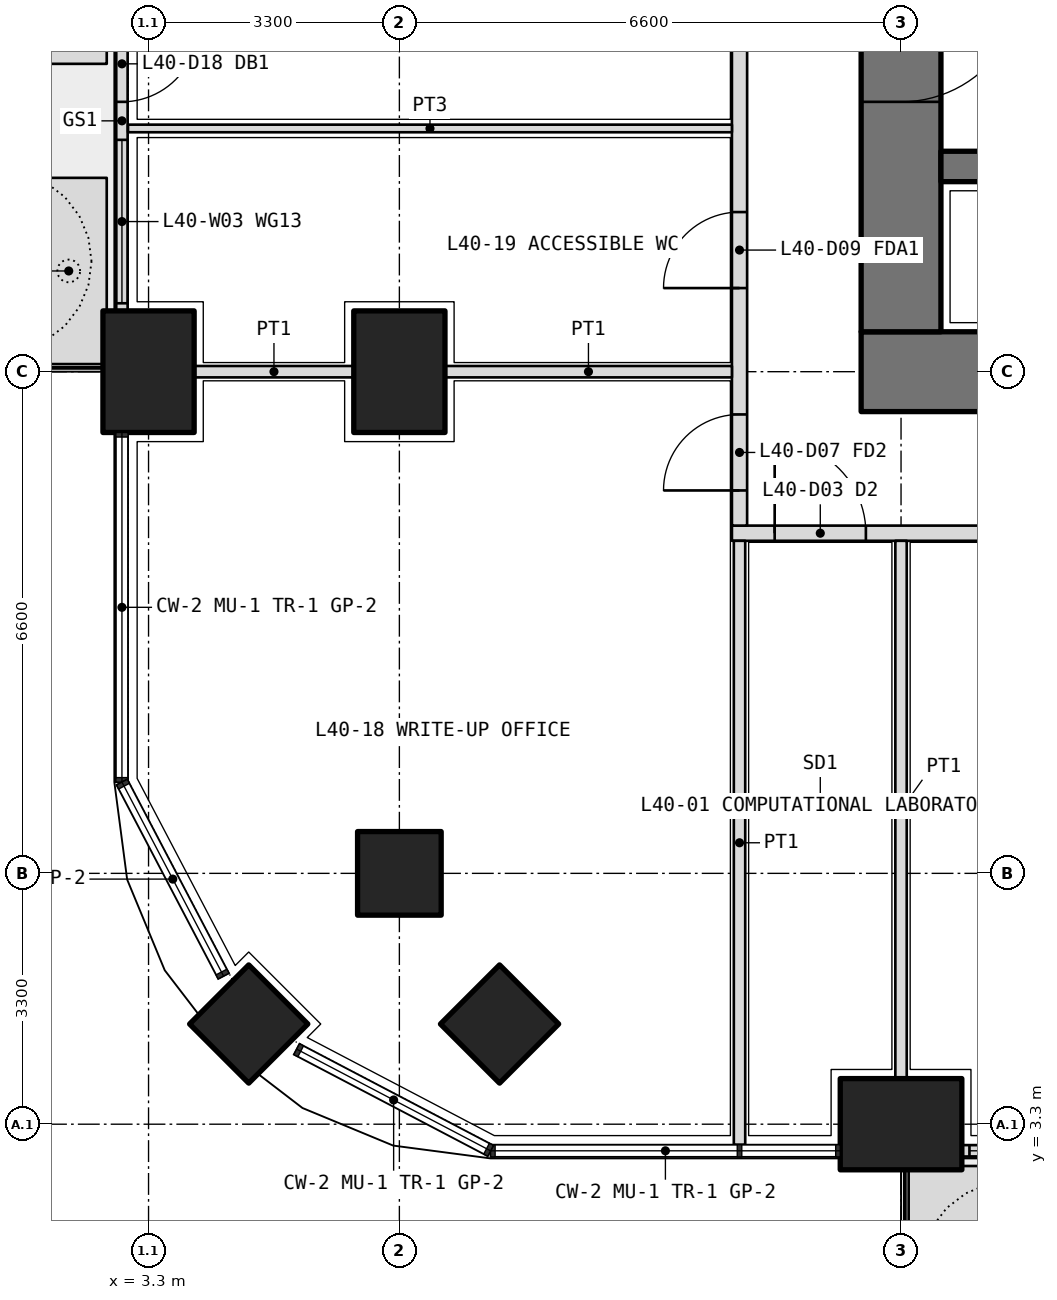
"""IFC4 building model, lengths in metres.
Left out: names, types, materials, properties, quantities, classifications, styles, units other than length and angle.
Written with IfcOpenShell. Run it as: python <this file> out.ifc"""

import sys

from ifc_helpers import new_model, si_unit, direction, frame, frame_2d, origin, origin_2d, place, context, subcontext, project, spatial, polyline, rectangle, outline, extrude, element, fill, save


model = new_model("IFC4")
c1 = context("Model", 3, precision=1e-05, world=origin(), true_north=direction((0.0, 1.0)))
c2 = subcontext(c1, "Body", "Model", "MODEL_VIEW")
j1 = project(units=[si_unit("LENGTHUNIT", "METRE"), si_unit("PLANEANGLEUNIT", "RADIAN")], contexts=[c1])
p1 = place(None, origin())
s1 = spatial("IfcSite", under=j1, at=p1, CompositionType="ELEMENT")
p2 = place(p1, origin())
s2 = spatial("IfcBuilding", under=s1, at=p2, CompositionType="ELEMENT")
p3 = place(p2, frame((0.0, 0.0, 176.7)))
s3 = spatial("IfcBuildingStorey", under=s2, at=p3, CompositionType="ELEMENT", Elevation=176.7)
p4 = place(p3, frame((4.618, 4.618, 0.0), z_axis=(0.0, 0.0, 1.0), x_axis=(0.707106781187, 0.707106781187, 0.0)))
e1 = element("IfcColumn", 1, at=p4, inside=s3, PredefinedType="COLUMN", context=c2, shape_type="SweptSolid", body=[
    extrude(rectangle(XDim=1.1, YDim=1.1, at=origin_2d()), origin(), (0.0, 0.0, 1.0), 4.2),
])
for number, where, z_axis, x_axis in (
    (2, (13.2, 3.3, 0.0), (0.0, 0.0, 1.0), (1.0, 0.0, 0.0)),
    (3, (3.3, 13.2, 0.0), (0.0, 0.0, 1.0), (0.0, 1.0, 0.0)),
):
    element("IfcColumn", number, at=place(p3, frame(where, z_axis=z_axis, x_axis=x_axis)), inside=s3, PredefinedType="COLUMN", context=c2, shape_type="SweptSolid", body=[
        extrude(rectangle(XDim=1.6, YDim=1.2, at=origin_2d()), origin(), (0.0, 0.0, 1.0), 4.2),
    ])
for number, where, z_axis, x_axis in (
    (4, (6.6, 6.6, 0.0), (0.0, 0.0, 1.0), (1.0, 0.0, 0.0)),
    (5, (7.918, 4.618, 0.0), (0.0, 0.0, 1.0), (0.707, 0.707, 0.0)),
):
    element("IfcColumn", number, at=place(p3, frame(where, z_axis=z_axis, x_axis=x_axis)), inside=s3, PredefinedType="COLUMN", context=c2, shape_type="SweptSolid", body=[
        extrude(rectangle(XDim=1.1, YDim=1.1, at=origin_2d()), origin(), (0.0, 0.0, 1.0), 4.2),
    ])
p5 = place(p3, frame((6.6, 13.2, 0.0), z_axis=(0.0, 0.0, 1.0), x_axis=(0.0, 1.0, 0.0)))
e6 = element("IfcColumn", 6, at=p5, inside=s3, PredefinedType="COLUMN", context=c2, shape_type="SweptSolid", body=[
    extrude(rectangle(XDim=1.6, YDim=1.2, at=origin_2d()), origin(), (0.0, 0.0, 1.0), 4.2),
])
p6 = place(p3, origin())
e7 = element("IfcWall", 7, at=p6, inside=s3, PredefinedType="USERDEFINED", context=c2, shape_type="SweptSolid", body=[
    extrude(outline(polyline([(13.3, 1.75), (15.75, 1.75), (15.75, 2.75), (13.3, 2.75), (13.3, 1.75)]), holes=[polyline([(13.45, 1.9), (15.6, 1.9), (15.6, 2.6), (13.45, 2.6), (13.45, 1.9)])]), origin(), (0.0, 0.0, 1.0), 1.05),
])
p7 = place(p3, origin())
e8 = element("IfcWall", 8, at=p7, inside=s3, PredefinedType="USERDEFINED", context=c2, shape_type="SweptSolid", body=[
    extrude(outline(polyline([(1.75, 13.3), (2.75, 13.3), (2.75, 15.75), (1.75, 15.75), (1.75, 13.3)]), holes=[polyline([(1.9, 13.45), (2.6, 13.45), (2.6, 15.6), (1.9, 15.6), (1.9, 13.45)])]), origin(), (0.0, 0.0, 1.0), 1.05),
])
p8 = place(p3, origin())
e9 = element("IfcWall", 9, at=p8, inside=s3, PredefinedType="USERDEFINED", context=c2, shape_type="SweptSolid", body=[
    extrude(outline(polyline([(1.75, 17.25), (2.75, 17.25), (2.75, 26.3), (1.75, 26.3), (1.75, 17.25)]), holes=[polyline([(1.9, 17.4), (2.6, 17.4), (2.6, 26.15), (1.9, 26.15), (1.9, 17.4)])]), origin(), (0.0, 0.0, 1.0), 1.05),
])
p9 = place(p3, frame((14.0, 2.95, 0.0), z_axis=(0.0, 0.0, 1.0), x_axis=(1.0, 0.0, 0.0)))
e10 = element("IfcWall", 10, at=p9, inside=s3, PredefinedType="SOLIDWALL", context=c2, shape_type="SweptSolid", body=[
    extrude(rectangle(XDim=5.0, YDim=0.15, at=frame_2d((2.5, 0.0))), origin(), (0.0, 0.0, 1.0), 2.7),
])
p10 = place(p9, frame((2.75, 0.0, 0.0)))
e11 = element("IfcOpeningElement", 11, at=p10, cuts=e10, PredefinedType="OPENING", context=c2, shape_type="SweptSolid", body=[
    extrude(rectangle(XDim=1.0, YDim=2.4, at=frame_2d((0.5, 1.2))), frame((0.0, 0.085, 0.0), z_axis=(0.0, -1.0, 0.0), x_axis=(1.0, 0.0, 0.0)), (0.0, 0.0, 1.0), 0.17),
])
p11 = place(p9, frame((0.1, 0.0, 0.1)))
e12 = element("IfcOpeningElement", 12, at=p11, cuts=e10, PredefinedType="OPENING", context=c2, shape_type="SweptSolid", body=[
    extrude(rectangle(XDim=2.15, YDim=2.3, at=frame_2d((1.075, 1.15))), frame((0.0, 0.085, 0.0), z_axis=(0.0, -1.0, 0.0), x_axis=(1.0, 0.0, 0.0)), (0.0, 0.0, 1.0), 0.17),
])
p12 = place(p9, frame((3.85, 0.0, 0.1)))
e13 = element("IfcOpeningElement", 13, at=p12, cuts=e10, PredefinedType="OPENING", context=c2, shape_type="SweptSolid", body=[
    extrude(rectangle(XDim=1.05, YDim=2.3, at=frame_2d((0.525, 1.15))), frame((0.0, 0.085, 0.0), z_axis=(0.0, -1.0, 0.0), x_axis=(1.0, 0.0, 0.0)), (0.0, 0.0, 1.0), 0.17),
])
p13 = place(p3, frame((2.95, 19.0, 0.0), z_axis=(0.0, 0.0, 1.0), x_axis=(0.0, -1.0, 0.0)))
e14 = element("IfcWall", 14, at=p13, inside=s3, PredefinedType="SOLIDWALL", context=c2, shape_type="SweptSolid", body=[
    extrude(rectangle(XDim=5.0, YDim=0.15, at=frame_2d((2.5, 0.0))), origin(), (0.0, 0.0, 1.0), 2.7),
])
p14 = place(p13, frame((1.25, 0.0, 0.0)))
e15 = element("IfcOpeningElement", 15, at=p14, cuts=e14, PredefinedType="OPENING", context=c2, shape_type="SweptSolid", body=[
    extrude(rectangle(XDim=1.0, YDim=2.4, at=frame_2d((0.5, 1.2))), frame((0.0, 0.085, 0.0), z_axis=(0.0, -1.0, 0.0), x_axis=(1.0, 0.0, 0.0)), (0.0, 0.0, 1.0), 0.17),
])
p15 = place(p13, frame((0.1, 0.0, 0.1)))
e16 = element("IfcOpeningElement", 16, at=p15, cuts=e14, PredefinedType="OPENING", context=c2, shape_type="SweptSolid", body=[
    extrude(rectangle(XDim=1.05, YDim=2.3, at=frame_2d((0.525, 1.15))), frame((0.0, 0.085, 0.0), z_axis=(0.0, -1.0, 0.0), x_axis=(1.0, 0.0, 0.0)), (0.0, 0.0, 1.0), 0.17),
])
p16 = place(p13, frame((2.75, 0.0, 0.1)))
e17 = element("IfcOpeningElement", 17, at=p16, cuts=e14, PredefinedType="OPENING", context=c2, shape_type="SweptSolid", body=[
    extrude(rectangle(XDim=2.15, YDim=2.3, at=frame_2d((1.075, 1.15))), frame((0.0, 0.085, 0.0), z_axis=(0.0, -1.0, 0.0), x_axis=(1.0, 0.0, 0.0)), (0.0, 0.0, 1.0), 0.17),
])
p17 = place(p3, frame((12.675, 13.2, 0.0), z_axis=(0.0, 0.0, 1.0), x_axis=(1.0, 0.0, 0.0)))
e18 = element("IfcWall", 18, at=p17, inside=s3, PredefinedType="SHEAR", context=c2, shape_type="SweptSolid", body=[
    extrude(rectangle(XDim=27.45, YDim=1.05, at=frame_2d((13.725, 0.0))), origin(), (0.0, 0.0, 1.0), 4.2),
])
p18 = place(p3, frame((13.2, 32.475, 0.0), z_axis=(0.0, 0.0, 1.0), x_axis=(0.0, -1.0, 0.0)))
e19 = element("IfcWall", 19, at=p18, inside=s3, PredefinedType="SHEAR", context=c2, shape_type="SweptSolid", body=[
    extrude(rectangle(XDim=18.75, YDim=1.05, at=frame_2d((9.375, 0.0))), origin(), (0.0, 0.0, 1.0), 4.2),
])
p19 = place(p18, frame((14.125, 0.0, 0.0)))
e20 = element("IfcOpeningElement", 20, at=p19, cuts=e19, PredefinedType="OPENING", context=c2, shape_type="SweptSolid", body=[
    extrude(rectangle(XDim=1.6, YDim=2.1, at=frame_2d((0.8, 1.05))), frame((0.0, 0.535, 0.0), z_axis=(0.0, -1.0, 0.0), x_axis=(1.0, 0.0, 0.0)), (0.0, 0.0, 1.0), 1.07),
])
p20 = place(p18, frame((3.325, 0.0, 0.0)))
e21 = element("IfcOpeningElement", 21, at=p20, cuts=e19, PredefinedType="OPENING", context=c2, shape_type="SweptSolid", body=[
    extrude(rectangle(XDim=1.6, YDim=2.1, at=frame_2d((0.8, 1.05))), frame((0.0, 0.535, 0.0), z_axis=(0.0, -1.0, 0.0), x_axis=(1.0, 0.0, 0.0)), (0.0, 0.0, 1.0), 1.07),
])
p21 = place(p3, frame((13.725, 15.9, 0.0), z_axis=(0.0, 0.0, 1.0), x_axis=(1.0, 0.0, 0.0)))
e22 = element("IfcWall", 22, at=p21, inside=s3, PredefinedType="SHEAR", context=c2, shape_type="SweptSolid", body=[
    extrude(rectangle(XDim=25.35, YDim=0.4, at=frame_2d((12.675, 0.0))), origin(), (0.0, 0.0, 1.0), 4.2),
])
p22 = place(p21, frame((0.837, 0.0, 0.0)))
e23 = element("IfcOpeningElement", 23, at=p22, cuts=e22, PredefinedType="OPENING", context=c2, shape_type="SweptSolid", body=[
    extrude(rectangle(XDim=1.0, YDim=2.1, at=frame_2d((0.5, 1.05))), frame((0.0, 0.21, 0.0), z_axis=(0.0, -1.0, 0.0), x_axis=(1.0, 0.0, 0.0)), (0.0, 0.0, 1.0), 0.42),
])
p23 = place(p21, frame((3.925, 0.0, 0.0)))
e24 = element("IfcOpeningElement", 24, at=p23, cuts=e22, PredefinedType="OPENING", context=c2, shape_type="SweptSolid", body=[
    extrude(rectangle(XDim=1.0, YDim=2.1, at=frame_2d((0.5, 1.05))), frame((0.0, 0.21, 0.0), z_axis=(0.0, -1.0, 0.0), x_axis=(1.0, 0.0, 0.0)), (0.0, 0.0, 1.0), 0.42),
])
p24 = place(p21, frame((7.225, 0.0, 0.0)))
e25 = element("IfcOpeningElement", 25, at=p24, cuts=e22, PredefinedType="OPENING", context=c2, shape_type="SweptSolid", body=[
    extrude(rectangle(XDim=1.0, YDim=2.1, at=frame_2d((0.5, 1.05))), frame((0.0, 0.21, 0.0), z_axis=(0.0, -1.0, 0.0), x_axis=(1.0, 0.0, 0.0)), (0.0, 0.0, 1.0), 0.42),
])
p25 = place(p21, frame((10.525, 0.0, 0.0)))
e26 = element("IfcOpeningElement", 26, at=p25, cuts=e22, PredefinedType="OPENING", context=c2, shape_type="SweptSolid", body=[
    extrude(rectangle(XDim=1.0, YDim=2.1, at=frame_2d((0.5, 1.05))), frame((0.0, 0.21, 0.0), z_axis=(0.0, -1.0, 0.0), x_axis=(1.0, 0.0, 0.0)), (0.0, 0.0, 1.0), 0.42),
])
p26 = place(p21, frame((13.825, 0.0, 0.0)))
e27 = element("IfcOpeningElement", 27, at=p26, cuts=e22, PredefinedType="OPENING", context=c2, shape_type="SweptSolid", body=[
    extrude(rectangle(XDim=1.0, YDim=2.1, at=frame_2d((0.5, 1.05))), frame((0.0, 0.21, 0.0), z_axis=(0.0, -1.0, 0.0), x_axis=(1.0, 0.0, 0.0)), (0.0, 0.0, 1.0), 0.42),
])
p27 = place(p21, frame((17.125, 0.0, 0.0)))
e28 = element("IfcOpeningElement", 28, at=p27, cuts=e22, PredefinedType="OPENING", context=c2, shape_type="SweptSolid", body=[
    extrude(rectangle(XDim=1.0, YDim=2.1, at=frame_2d((0.5, 1.05))), frame((0.0, 0.21, 0.0), z_axis=(0.0, -1.0, 0.0), x_axis=(1.0, 0.0, 0.0)), (0.0, 0.0, 1.0), 0.42),
])
p28 = place(p21, frame((20.425, 0.0, 0.0)))
e29 = element("IfcOpeningElement", 29, at=p28, cuts=e22, PredefinedType="OPENING", context=c2, shape_type="SweptSolid", body=[
    extrude(rectangle(XDim=1.0, YDim=2.1, at=frame_2d((0.5, 1.05))), frame((0.0, 0.21, 0.0), z_axis=(0.0, -1.0, 0.0), x_axis=(1.0, 0.0, 0.0)), (0.0, 0.0, 1.0), 0.42),
])
p29 = place(p21, frame((23.512, 0.0, 0.0)))
e30 = element("IfcOpeningElement", 30, at=p29, cuts=e22, PredefinedType="OPENING", context=c2, shape_type="SweptSolid", body=[
    extrude(rectangle(XDim=1.0, YDim=2.1, at=frame_2d((0.5, 1.05))), frame((0.0, 0.21, 0.0), z_axis=(0.0, -1.0, 0.0), x_axis=(1.0, 0.0, 0.0)), (0.0, 0.0, 1.0), 0.42),
])
p30 = place(p3, frame((10.975, 11.075, 0.0), z_axis=(0.0, 0.0, 1.0), x_axis=(1.0, 0.0, 0.0)))
e31 = element("IfcWall", 31, at=p30, inside=s3, PredefinedType="PARTITIONING", context=c2, shape_type="SweptSolid", body=[
    extrude(rectangle(XDim=22.025, YDim=0.2, at=frame_2d((11.012, 0.0))), origin(), (0.0, 0.0, 1.0), 2.85),
])
p31 = place(p30, frame((0.562, 0.0, 0.0)))
e32 = element("IfcOpeningElement", 32, at=p31, cuts=e31, PredefinedType="OPENING", context=c2, shape_type="SweptSolid", body=[
    extrude(rectangle(XDim=1.2, YDim=2.1, at=frame_2d((0.6, 1.05))), frame((0.0, 0.11, 0.0), z_axis=(0.0, -1.0, 0.0), x_axis=(1.0, 0.0, 0.0)), (0.0, 0.0, 1.0), 0.22),
])
p32 = place(p30, frame((6.675, 0.0, 0.0)))
e33 = element("IfcOpeningElement", 33, at=p32, cuts=e31, PredefinedType="OPENING", context=c2, shape_type="SweptSolid", body=[
    extrude(rectangle(XDim=1.0, YDim=2.1, at=frame_2d((0.5, 1.05))), frame((0.0, 0.11, 0.0), z_axis=(0.0, -1.0, 0.0), x_axis=(1.0, 0.0, 0.0)), (0.0, 0.0, 1.0), 0.22),
])
p33 = place(p30, frame((16.575, 0.0, 0.0)))
e34 = element("IfcOpeningElement", 34, at=p33, cuts=e31, PredefinedType="OPENING", context=c2, shape_type="SweptSolid", body=[
    extrude(rectangle(XDim=1.0, YDim=2.1, at=frame_2d((0.5, 1.05))), frame((0.0, 0.11, 0.0), z_axis=(0.0, -1.0, 0.0), x_axis=(1.0, 0.0, 0.0)), (0.0, 0.0, 1.0), 0.22),
])
p34 = place(p3, frame((11.075, 11.175, 0.0), z_axis=(0.0, 0.0, 1.0), x_axis=(0.0, 1.0, 0.0)))
e35 = element("IfcWall", 35, at=p34, inside=s3, PredefinedType="PARTITIONING", context=c2, shape_type="SweptSolid", body=[
    extrude(rectangle(XDim=23.85, YDim=0.2, at=frame_2d((11.925, 0.0))), origin(), (0.0, 0.0, 1.0), 2.85),
])
p35 = place(p34, frame((0.462, 0.0, 0.0)))
e36 = element("IfcOpeningElement", 36, at=p35, cuts=e35, PredefinedType="OPENING", context=c2, shape_type="SweptSolid", body=[
    extrude(rectangle(XDim=1.0, YDim=2.1, at=frame_2d((0.5, 1.05))), frame((0.0, 0.11, 0.0), z_axis=(0.0, -1.0, 0.0), x_axis=(1.0, 0.0, 0.0)), (0.0, 0.0, 1.0), 0.22),
])
p36 = place(p34, frame((3.125, 0.0, 0.0)))
e37 = element("IfcOpeningElement", 37, at=p36, cuts=e35, PredefinedType="OPENING", context=c2, shape_type="SweptSolid", body=[
    extrude(rectangle(XDim=1.0, YDim=2.1, at=frame_2d((0.5, 1.05))), frame((0.0, 0.11, 0.0), z_axis=(0.0, -1.0, 0.0), x_axis=(1.0, 0.0, 0.0)), (0.0, 0.0, 1.0), 0.22),
])
p37 = place(p34, frame((6.475, 0.0, 0.0)))
e38 = element("IfcOpeningElement", 38, at=p37, cuts=e35, PredefinedType="OPENING", context=c2, shape_type="SweptSolid", body=[
    extrude(rectangle(XDim=0.9, YDim=2.1, at=frame_2d((0.45, 1.05))), frame((0.0, 0.11, 0.0), z_axis=(0.0, -1.0, 0.0), x_axis=(1.0, 0.0, 0.0)), (0.0, 0.0, 1.0), 0.22),
])
p38 = place(p34, frame((9.675, 0.0, 0.0)))
e39 = element("IfcOpeningElement", 39, at=p38, cuts=e35, PredefinedType="OPENING", context=c2, shape_type="SweptSolid", body=[
    extrude(rectangle(XDim=0.9, YDim=2.1, at=frame_2d((0.45, 1.05))), frame((0.0, 0.11, 0.0), z_axis=(0.0, -1.0, 0.0), x_axis=(1.0, 0.0, 0.0)), (0.0, 0.0, 1.0), 0.22),
])
p39 = place(p34, frame((12.925, 0.0, 0.0)))
e40 = element("IfcOpeningElement", 40, at=p39, cuts=e35, PredefinedType="OPENING", context=c2, shape_type="SweptSolid", body=[
    extrude(rectangle(XDim=1.0, YDim=2.1, at=frame_2d((0.5, 1.05))), frame((0.0, 0.11, 0.0), z_axis=(0.0, -1.0, 0.0), x_axis=(1.0, 0.0, 0.0)), (0.0, 0.0, 1.0), 0.22),
])
p40 = place(p34, frame((19.087, 0.0, 0.0)))
e41 = element("IfcOpeningElement", 41, at=p40, cuts=e35, PredefinedType="OPENING", context=c2, shape_type="SweptSolid", body=[
    extrude(rectangle(XDim=1.0, YDim=2.1, at=frame_2d((0.5, 1.05))), frame((0.0, 0.11, 0.0), z_axis=(0.0, -1.0, 0.0), x_axis=(1.0, 0.0, 0.0)), (0.0, 0.0, 1.0), 0.22),
])
p41 = place(p3, frame((11.075, 3.03, 0.0), z_axis=(0.0, 0.0, 1.0), x_axis=(0.0, 1.0, 0.0)))
e42 = element("IfcWall", 42, at=p41, inside=s3, PredefinedType="PARTITIONING", context=c2, shape_type="SweptSolid", body=[
    extrude(rectangle(XDim=7.945, YDim=0.15, at=frame_2d((3.973, 0.0))), origin(), (0.0, 0.0, 1.0), 2.7),
])
p42 = place(p3, frame((13.2, 3.9, 0.0), z_axis=(0.0, 0.0, 1.0), x_axis=(0.0, 1.0, 0.0)))
e43 = element("IfcWall", 43, at=p42, inside=s3, PredefinedType="PARTITIONING", context=c2, shape_type="SweptSolid", body=[
    extrude(rectangle(XDim=7.075, YDim=0.15, at=frame_2d((3.538, 0.0))), origin(), (0.0, 0.0, 1.0), 2.85),
])
p43 = place(p3, frame((3.03, 16.4, 0.0), z_axis=(0.0, 0.0, 1.0), x_axis=(1.0, 0.0, 0.0)))
e44 = element("IfcWall", 44, at=p43, inside=s3, PredefinedType="PARTITIONING", context=c2, shape_type="SweptSolid", body=[
    extrude(rectangle(XDim=7.945, YDim=0.1, at=frame_2d((3.973, 0.0))), origin(), (0.0, 0.0, 1.0), 2.7),
])
p44 = place(p3, frame((3.9, 13.2, 0.0), z_axis=(0.0, 0.0, 1.0), x_axis=(1.0, 0.0, 0.0)))
e45 = element("IfcWall", 45, at=p44, inside=s3, PredefinedType="PARTITIONING", context=c2, shape_type="SweptSolid", body=[
    extrude(rectangle(XDim=2.1, YDim=0.15, at=frame_2d((1.05, 0.0))), origin(), (0.0, 0.0, 1.0), 2.85),
])
p45 = place(p3, frame((7.2, 13.2, 0.0), z_axis=(0.0, 0.0, 1.0), x_axis=(1.0, 0.0, 0.0)))
e46 = element("IfcWall", 46, at=p45, inside=s3, PredefinedType="PARTITIONING", context=c2, shape_type="SweptSolid", body=[
    extrude(rectangle(XDim=3.775, YDim=0.15, at=frame_2d((1.888, 0.0))), origin(), (0.0, 0.0, 1.0), 2.85),
])
p46 = place(p11, origin())
e47 = element("IfcWindow", 47, at=p46, inside=s3, PartitioningType="SINGLE_PANEL", PredefinedType="WINDOW", context=c2, shape_type="SweptSolid", body=[
    extrude(rectangle(XDim=2.15, YDim=2.3, at=frame_2d((1.075, 1.15))), frame((0.0, 0.03, 0.0), z_axis=(0.0, -1.0, 0.0), x_axis=(1.0, 0.0, 0.0)), (0.0, 0.0, 1.0), 0.06),
])
fill(e12, e47)
p47 = place(p14, origin())
e48 = element("IfcDoor", 48, at=p47, inside=s3, OperationType="SINGLE_SWING_LEFT", PredefinedType="DOOR", context=c2, shape_type="SweptSolid", body=[
    extrude(rectangle(XDim=1.0, YDim=2.4, at=frame_2d((0.5, 1.2))), frame((0.0, 0.025, 0.0), z_axis=(0.0, -1.0, 0.0), x_axis=(1.0, 0.0, 0.0)), (0.0, 0.0, 1.0), 0.05),
])
fill(e15, e48)
p48 = place(p16, origin())
e49 = element("IfcWindow", 49, at=p48, inside=s3, PartitioningType="SINGLE_PANEL", PredefinedType="WINDOW", context=c2, shape_type="SweptSolid", body=[
    extrude(rectangle(XDim=2.15, YDim=2.3, at=frame_2d((1.075, 1.15))), frame((0.0, 0.03, 0.0), z_axis=(0.0, -1.0, 0.0), x_axis=(1.0, 0.0, 0.0)), (0.0, 0.0, 1.0), 0.06),
])
fill(e17, e49)
p49 = place(p31, origin())
e50 = element("IfcDoor", 50, at=p49, inside=s3, OperationType="DOUBLE_DOOR_SINGLE_SWING", PredefinedType="DOOR", context=c2, shape_type="SweptSolid", body=[
    extrude(rectangle(XDim=1.2, YDim=2.1, at=frame_2d((0.6, 1.05))), frame((0.0, 0.025, 0.0), z_axis=(0.0, -1.0, 0.0), x_axis=(1.0, 0.0, 0.0)), (0.0, 0.0, 1.0), 0.05),
])
fill(e32, e50)
p50 = place(p35, origin())
e51 = element("IfcDoor", 51, at=p50, inside=s3, OperationType="SINGLE_SWING_LEFT", PredefinedType="DOOR", context=c2, shape_type="SweptSolid", body=[
    extrude(rectangle(XDim=1.0, YDim=2.1, at=frame_2d((0.5, 1.05))), frame((0.0, 0.025, 0.0), z_axis=(0.0, -1.0, 0.0), x_axis=(1.0, 0.0, 0.0)), (0.0, 0.0, 1.0), 0.05),
])
fill(e36, e51)
p51 = place(p36, origin())
e52 = element("IfcDoor", 52, at=p51, inside=s3, OperationType="SINGLE_SWING_LEFT", PredefinedType="DOOR", context=c2, shape_type="SweptSolid", body=[
    extrude(rectangle(XDim=1.0, YDim=2.1, at=frame_2d((0.5, 1.05))), frame((0.0, 0.025, 0.0), z_axis=(0.0, -1.0, 0.0), x_axis=(1.0, 0.0, 0.0)), (0.0, 0.0, 1.0), 0.05),
])
fill(e37, e52)
p52 = place(p19, origin())
e53 = element("IfcDoor", 53, at=p52, inside=s3, OperationType="DOUBLE_DOOR_DOUBLE_SWING", PredefinedType="DOOR", context=c2, shape_type="SweptSolid", body=[
    extrude(rectangle(XDim=1.6, YDim=2.1, at=frame_2d((0.8, 1.05))), frame((0.0, 0.025, 0.0), z_axis=(0.0, -1.0, 0.0), x_axis=(1.0, 0.0, 0.0)), (0.0, 0.0, 1.0), 0.05),
])
fill(e20, e53)
save(model, sys.argv[1])
